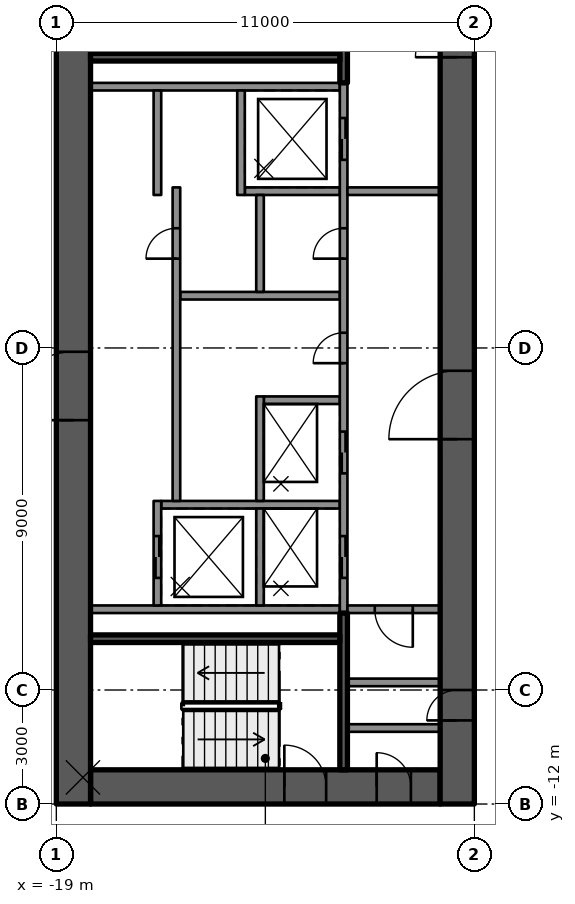
"""IFC4 building model, lengths in metres.
Left out: names, types, materials, properties, quantities, classifications, styles, units other than length and angle.
Written with IfcOpenShell. Run it as: python <this file> out.ifc"""

import sys

from ifc_helpers import new_model, si_unit, direction, frame, frame_2d, origin, place, context, subcontext, project, spatial, rectangle, extrude, element, fill, save


model = new_model("IFC4")
c1 = context("Model", 3, precision=1e-05, world=origin(), true_north=direction((0.0, 1.0)))
c2 = subcontext(c1, "Body", "Model", "MODEL_VIEW")
j1 = project(units=[si_unit("LENGTHUNIT", "METRE"), si_unit("PLANEANGLEUNIT", "RADIAN")], contexts=[c1])
p1 = place(None, origin())
s1 = spatial("IfcSite", under=j1, at=p1, CompositionType="ELEMENT")
p2 = place(p1, origin())
s2 = spatial("IfcBuilding", under=s1, at=p2, CompositionType="ELEMENT")
p3 = place(p2, frame((0.0, 0.0, 232.0)))
s3 = spatial("IfcBuildingStorey", under=s2, at=p3, CompositionType="ELEMENT", Elevation=232.0)
p4 = place(p3, frame((-18.1, -11.55, 0.0), z_axis=(0.0, 0.0, 1.0), x_axis=(1.0, 0.0, 0.0)))
e1 = element("IfcWall", 1, at=p4, inside=s3, PredefinedType="SHEAR", context=c2, shape_type="SweptSolid", body=[
    extrude(rectangle(XDim=9.2, YDim=0.9, at=frame_2d((4.6, 0.0))), origin(), (0.0, 0.0, 1.0), 3.5),
])
p5 = place(p4, frame((5.1, 0.0, 0.0)))
e2 = element("IfcOpeningElement", 2, at=p5, cuts=e1, PredefinedType="OPENING", context=c2, shape_type="SweptSolid", body=[
    extrude(rectangle(XDim=1.1, YDim=2.1, at=frame_2d((0.55, 1.05))), frame((0.0, 0.46, 0.0), z_axis=(0.0, -1.0, 0.0), x_axis=(1.0, 0.0, 0.0)), (0.0, 0.0, 1.0), 0.92),
])
p6 = place(p4, frame((7.53, 0.0, 0.0)))
e3 = element("IfcOpeningElement", 3, at=p6, cuts=e1, PredefinedType="OPENING", context=c2, shape_type="SweptSolid", body=[
    extrude(rectangle(XDim=0.9, YDim=2.1, at=frame_2d((0.45, 1.05))), frame((0.0, 0.46, 0.0), z_axis=(0.0, -1.0, 0.0), x_axis=(1.0, 0.0, 0.0)), (0.0, 0.0, 1.0), 0.92),
])
p7 = place(p3, frame((-18.55, -12.0, 0.0), z_axis=(0.0, 0.0, 1.0), x_axis=(0.0, 1.0, 0.0)))
e4 = element("IfcWall", 4, at=p7, inside=s3, PredefinedType="SHEAR", context=c2, shape_type="SweptSolid", body=[
    extrude(rectangle(XDim=24.0, YDim=0.9, at=frame_2d((12.0, 0.0))), origin(), (0.0, 0.0, 1.0), 3.5),
])
p8 = place(p7, frame((10.1, 0.0, 0.0)))
e5 = element("IfcOpeningElement", 5, at=p8, cuts=e4, PredefinedType="OPENING", context=c2, shape_type="SweptSolid", body=[
    extrude(rectangle(XDim=1.8, YDim=2.1, at=frame_2d((0.9, 1.05))), frame((0.0, 0.46, 0.0), z_axis=(0.0, -1.0, 0.0), x_axis=(1.0, 0.0, 0.0)), (0.0, 0.0, 1.0), 0.92),
])
p9 = place(p3, frame((-8.45, -12.0, 0.0), z_axis=(0.0, 0.0, 1.0), x_axis=(0.0, 1.0, 0.0)))
e6 = element("IfcWall", 6, at=p9, inside=s3, PredefinedType="SHEAR", context=c2, shape_type="SweptSolid", body=[
    extrude(rectangle(XDim=24.0, YDim=0.9, at=frame_2d((12.0, 0.0))), origin(), (0.0, 0.0, 1.0), 3.5),
])
p10 = place(p9, frame((9.6, 0.0, 0.0)))
e7 = element("IfcOpeningElement", 7, at=p10, cuts=e6, PredefinedType="OPENING", context=c2, shape_type="SweptSolid", body=[
    extrude(rectangle(XDim=1.8, YDim=2.1, at=frame_2d((0.9, 1.05))), frame((0.0, 0.46, 0.0), z_axis=(0.0, -1.0, 0.0), x_axis=(1.0, 0.0, 0.0)), (0.0, 0.0, 1.0), 0.92),
])
p11 = place(p9, frame((19.65, 0.0, 0.0)))
e8 = element("IfcOpeningElement", 8, at=p11, cuts=e6, PredefinedType="OPENING", context=c2, shape_type="SweptSolid", body=[
    extrude(rectangle(XDim=1.1, YDim=2.1, at=frame_2d((0.55, 1.05))), frame((0.0, 0.46, 0.0), z_axis=(0.0, -1.0, 0.0), x_axis=(1.0, 0.0, 0.0)), (0.0, 0.0, 1.0), 0.92),
])
p12 = place(p9, frame((2.2, 0.0, 0.0)))
e9 = element("IfcOpeningElement", 9, at=p12, cuts=e6, PredefinedType="OPENING", context=c2, shape_type="SweptSolid", body=[
    extrude(rectangle(XDim=0.8, YDim=2.1, at=frame_2d((0.4, 1.05))), frame((0.0, 0.46, 0.0), z_axis=(0.0, -1.0, 0.0), x_axis=(1.0, 0.0, 0.0)), (0.0, 0.0, 1.0), 0.92),
])
for number, where, z_axis, x_axis in (
    (10, (-11.54, 6.875, 0.0), (0.0, 0.0, 1.0), (-1.0, 0.0, 0.0)),
    (11, (-11.54, -6.875, 0.0), (0.0, 0.0, 1.0), (-1.0, 0.0, 0.0)),
):
    element("IfcWall", number, at=place(p3, frame(where, z_axis=z_axis, x_axis=x_axis)), inside=s3, PredefinedType="SOLIDWALL", context=c2, shape_type="SweptSolid", body=[
        extrude(rectangle(XDim=6.56, YDim=0.2, at=frame_2d((3.28, 0.0))), origin(), (0.0, 0.0, 1.0), 3.09),
    ])
p13 = place(p3, frame((-11.54, -4.125, 0.0), z_axis=(0.0, 0.0, 1.0), x_axis=(-1.0, 0.0, 0.0)))
e12 = element("IfcWall", 12, at=p13, inside=s3, PredefinedType="SOLIDWALL", context=c2, shape_type="SweptSolid", body=[
    extrude(rectangle(XDim=4.7, YDim=0.2, at=frame_2d((2.35, 0.0))), origin(), (0.0, 0.0, 1.0), 3.09),
])
p14 = place(p3, frame((-11.54, -1.375, 0.0), z_axis=(0.0, 0.0, 1.0), x_axis=(-1.0, 0.0, 0.0)))
e13 = element("IfcWall", 13, at=p14, inside=s3, PredefinedType="SOLIDWALL", context=c2, shape_type="SweptSolid", body=[
    extrude(rectangle(XDim=2.0, YDim=0.2, at=frame_2d((1.0, 0.0))), origin(), (0.0, 0.0, 1.0), 3.09),
])
p15 = place(p3, frame((-11.54, 1.375, 0.0), z_axis=(0.0, 0.0, 1.0), x_axis=(-1.0, 0.0, 0.0)))
e14 = element("IfcWall", 14, at=p15, inside=s3, PredefinedType="SOLIDWALL", context=c2, shape_type="SweptSolid", body=[
    extrude(rectangle(XDim=4.2, YDim=0.2, at=frame_2d((2.1, 0.0))), origin(), (0.0, 0.0, 1.0), 3.09),
])
p16 = place(p3, frame((-11.54, 4.125, 0.0), z_axis=(0.0, 0.0, 1.0), x_axis=(-1.0, 0.0, 0.0)))
e15 = element("IfcWall", 15, at=p16, inside=s3, PredefinedType="SOLIDWALL", context=c2, shape_type="SweptSolid", body=[
    extrude(rectangle(XDim=2.5, YDim=0.2, at=frame_2d((1.25, 0.0))), origin(), (0.0, 0.0, 1.0), 3.09),
])
p17 = place(p3, frame((-11.44, -6.975, 0.0), z_axis=(0.0, 0.0, 1.0), x_axis=(0.0, 1.0, 0.0)))
e16 = element("IfcWall", 16, at=p17, inside=s3, PredefinedType="SOLIDWALL", context=c2, shape_type="SweptSolid", body=[
    extrude(rectangle(XDim=13.95, YDim=0.2, at=frame_2d((6.975, 0.0))), origin(), (0.0, 0.0, 1.0), 3.09),
])
p18 = place(p17, frame((0.925, 0.0, 0.0)))
e17 = element("IfcOpeningElement", 17, at=p18, cuts=e16, PredefinedType="OPENING", context=c2, shape_type="SweptSolid", body=[
    extrude(rectangle(XDim=1.1, YDim=2.1, at=frame_2d((0.55, 1.05))), frame((0.0, 0.11, 0.0), z_axis=(0.0, -1.0, 0.0), x_axis=(1.0, 0.0, 0.0)), (0.0, 0.0, 1.0), 0.22),
])
p19 = place(p17, frame((3.675, 0.0, 0.0)))
e18 = element("IfcOpeningElement", 18, at=p19, cuts=e16, PredefinedType="OPENING", context=c2, shape_type="SweptSolid", body=[
    extrude(rectangle(XDim=1.1, YDim=2.1, at=frame_2d((0.55, 1.05))), frame((0.0, 0.11, 0.0), z_axis=(0.0, -1.0, 0.0), x_axis=(1.0, 0.0, 0.0)), (0.0, 0.0, 1.0), 0.22),
])
p20 = place(p17, frame((11.925, 0.0, 0.0)))
e19 = element("IfcOpeningElement", 19, at=p20, cuts=e16, PredefinedType="OPENING", context=c2, shape_type="SweptSolid", body=[
    extrude(rectangle(XDim=1.1, YDim=2.1, at=frame_2d((0.55, 1.05))), frame((0.0, 0.11, 0.0), z_axis=(0.0, -1.0, 0.0), x_axis=(1.0, 0.0, 0.0)), (0.0, 0.0, 1.0), 0.22),
])
p21 = place(p17, frame((6.575, 0.0, 0.0)))
e20 = element("IfcOpeningElement", 20, at=p21, cuts=e16, PredefinedType="OPENING", context=c2, shape_type="SweptSolid", body=[
    extrude(rectangle(XDim=0.8, YDim=2.1, at=frame_2d((0.4, 1.05))), frame((0.0, 0.11, 0.0), z_axis=(0.0, -1.0, 0.0), x_axis=(1.0, 0.0, 0.0)), (0.0, 0.0, 1.0), 0.22),
])
p22 = place(p17, frame((9.325, 0.0, 0.0)))
e21 = element("IfcOpeningElement", 21, at=p22, cuts=e16, PredefinedType="OPENING", context=c2, shape_type="SweptSolid", body=[
    extrude(rectangle(XDim=0.8, YDim=2.1, at=frame_2d((0.4, 1.05))), frame((0.0, 0.11, 0.0), z_axis=(0.0, -1.0, 0.0), x_axis=(1.0, 0.0, 0.0)), (0.0, 0.0, 1.0), 0.22),
])
p23 = place(p3, frame((-13.64, -6.775, 0.0), z_axis=(0.0, 0.0, 1.0), x_axis=(0.0, 1.0, 0.0)))
e22 = element("IfcWall", 22, at=p23, inside=s3, PredefinedType="SOLIDWALL", context=c2, shape_type="SweptSolid", body=[
    extrude(rectangle(XDim=2.55, YDim=0.2, at=frame_2d((1.275, 0.0))), origin(), (0.0, 0.0, 1.0), 3.09),
])
p24 = place(p3, frame((-13.64, -4.025, 0.0), z_axis=(0.0, 0.0, 1.0), x_axis=(0.0, 1.0, 0.0)))
e23 = element("IfcWall", 23, at=p24, inside=s3, PredefinedType="SOLIDWALL", context=c2, shape_type="SweptSolid", body=[
    extrude(rectangle(XDim=2.75, YDim=0.2, at=frame_2d((1.375, 0.0))), origin(), (0.0, 0.0, 1.0), 3.09),
])
p25 = place(p3, frame((-13.64, 1.475, 0.0), z_axis=(0.0, 0.0, 1.0), x_axis=(0.0, 1.0, 0.0)))
e24 = element("IfcWall", 24, at=p25, inside=s3, PredefinedType="SOLIDWALL", context=c2, shape_type="SweptSolid", body=[
    extrude(rectangle(XDim=2.55, YDim=0.2, at=frame_2d((1.275, 0.0))), origin(), (0.0, 0.0, 1.0), 3.09),
])
p26 = place(p3, frame((-14.14, 4.025, 0.0), z_axis=(0.0, 0.0, 1.0), x_axis=(0.0, 1.0, 0.0)))
e25 = element("IfcWall", 25, at=p26, inside=s3, PredefinedType="SOLIDWALL", context=c2, shape_type="SweptSolid", body=[
    extrude(rectangle(XDim=2.75, YDim=0.2, at=frame_2d((1.375, 0.0))), origin(), (0.0, 0.0, 1.0), 3.09),
])
p27 = place(p3, frame((-16.34, -6.775, 0.0), z_axis=(0.0, 0.0, 1.0), x_axis=(0.0, 1.0, 0.0)))
e26 = element("IfcWall", 26, at=p27, inside=s3, PredefinedType="SOLIDWALL", context=c2, shape_type="SweptSolid", body=[
    extrude(rectangle(XDim=2.75, YDim=0.2, at=frame_2d((1.375, 0.0))), origin(), (0.0, 0.0, 1.0), 3.09),
])
p28 = place(p27, frame((0.725, 0.0, 0.0)))
e27 = element("IfcOpeningElement", 27, at=p28, cuts=e26, PredefinedType="OPENING", context=c2, shape_type="SweptSolid", body=[
    extrude(rectangle(XDim=1.1, YDim=2.1, at=frame_2d((0.55, 1.05))), frame((0.0, 0.11, 0.0), z_axis=(0.0, -1.0, 0.0), x_axis=(1.0, 0.0, 0.0)), (0.0, 0.0, 1.0), 0.22),
])
p29 = place(p3, frame((-15.84, -4.025, 0.0), z_axis=(0.0, 0.0, 1.0), x_axis=(0.0, 1.0, 0.0)))
e28 = element("IfcWall", 28, at=p29, inside=s3, PredefinedType="SOLIDWALL", context=c2, shape_type="SweptSolid", body=[
    extrude(rectangle(XDim=8.25, YDim=0.2, at=frame_2d((4.125, 0.0))), origin(), (0.0, 0.0, 1.0), 3.09),
])
p30 = place(p29, frame((6.375, 0.0, 0.0)))
e29 = element("IfcOpeningElement", 29, at=p30, cuts=e28, PredefinedType="OPENING", context=c2, shape_type="SweptSolid", body=[
    extrude(rectangle(XDim=0.8, YDim=2.1, at=frame_2d((0.4, 1.05))), frame((0.0, 0.11, 0.0), z_axis=(0.0, -1.0, 0.0), x_axis=(1.0, 0.0, 0.0)), (0.0, 0.0, 1.0), 0.22),
])
p31 = place(p3, frame((-16.34, 4.025, 0.0), z_axis=(0.0, 0.0, 1.0), x_axis=(0.0, 1.0, 0.0)))
e30 = element("IfcWall", 30, at=p31, inside=s3, PredefinedType="SOLIDWALL", context=c2, shape_type="SweptSolid", body=[
    extrude(rectangle(XDim=2.75, YDim=0.2, at=frame_2d((1.375, 0.0))), origin(), (0.0, 0.0, 1.0), 3.09),
])
p32 = place(p3, frame((-11.44, 6.975, 0.0), z_axis=(0.0, 0.0, 1.0), x_axis=(0.0, 1.0, 0.0)))
e31 = element("IfcWall", 31, at=p32, inside=s3, PredefinedType="SOLIDWALL", context=c2, shape_type="SweptSolid", body=[
    extrude(rectangle(XDim=4.125, YDim=0.2, at=frame_2d((2.062, 0.0))), origin(), (0.0, 0.0, 1.0), 3.09),
])
p33 = place(p32, frame((2.1, 0.0, 0.0)))
e32 = element("IfcOpeningElement", 32, at=p33, cuts=e31, PredefinedType="OPENING", context=c2, shape_type="SweptSolid", body=[
    extrude(rectangle(XDim=1.1, YDim=2.1, at=frame_2d((0.55, 1.05))), frame((0.0, 0.11, 0.0), z_axis=(0.0, -1.0, 0.0), x_axis=(1.0, 0.0, 0.0)), (0.0, 0.0, 1.0), 0.22),
])
p34 = place(p3, frame((-11.54, 7.65, 0.0), z_axis=(0.0, 0.0, 1.0), x_axis=(-1.0, 0.0, 0.0)))
e33 = element("IfcWall", 33, at=p34, inside=s3, PredefinedType="SOLIDWALL", context=c2, shape_type="SweptSolid", body=[
    extrude(rectangle(XDim=6.56, YDim=0.2, at=frame_2d((3.28, 0.0))), origin(), (0.0, 0.0, 1.0), 3.09),
])
p35 = place(p3, frame((-11.44, -11.1, 0.0), z_axis=(0.0, 0.0, 1.0), x_axis=(0.0, 1.0, 0.0)))
e34 = element("IfcWall", 34, at=p35, inside=s3, PredefinedType="SOLIDWALL", context=c2, shape_type="SweptSolid", body=[
    extrude(rectangle(XDim=4.125, YDim=0.2, at=frame_2d((2.062, 0.0))), origin(), (0.0, 0.0, 1.0), 3.09),
])
p36 = place(p3, frame((-11.54, -7.65, 0.0), z_axis=(0.0, 0.0, 1.0), x_axis=(-1.0, 0.0, 0.0)))
e35 = element("IfcWall", 35, at=p36, inside=s3, PredefinedType="SOLIDWALL", context=c2, shape_type="SweptSolid", body=[
    extrude(rectangle(XDim=6.56, YDim=0.2, at=frame_2d((3.28, 0.0))), origin(), (0.0, 0.0, 1.0), 3.09),
])
p37 = place(p3, frame((-8.9, 4.125, 0.0), z_axis=(0.0, 0.0, 1.0), x_axis=(-1.0, 0.0, 0.0)))
e36 = element("IfcWall", 36, at=p37, inside=s3, PredefinedType="PARTITIONING", context=c2, shape_type="SweptSolid", body=[
    extrude(rectangle(XDim=2.44, YDim=0.2, at=frame_2d((1.22, 0.0))), origin(), (0.0, 0.0, 1.0), 3.09),
])
p38 = place(p3, frame((-8.9, -6.875, 0.0), z_axis=(0.0, 0.0, 1.0), x_axis=(-1.0, 0.0, 0.0)))
e37 = element("IfcWall", 37, at=p38, inside=s3, PredefinedType="PARTITIONING", context=c2, shape_type="SweptSolid", body=[
    extrude(rectangle(XDim=2.44, YDim=0.2, at=frame_2d((1.22, 0.0))), origin(), (0.0, 0.0, 1.0), 3.09),
])
p39 = place(p38, frame((0.72, 0.0, 0.0)))
e38 = element("IfcOpeningElement", 38, at=p39, cuts=e37, PredefinedType="OPENING", context=c2, shape_type="SweptSolid", body=[
    extrude(rectangle(XDim=1.0, YDim=2.1, at=frame_2d((0.5, 1.05))), frame((0.0, 0.11, 0.0), z_axis=(0.0, -1.0, 0.0), x_axis=(1.0, 0.0, 0.0)), (0.0, 0.0, 1.0), 0.22),
])
for number, where, z_axis, x_axis in (
    (39, (-8.9, -10.0, 0.0), (0.0, 0.0, 1.0), (-1.0, 0.0, 0.0)),
    (40, (-8.9, -8.8, 0.0), (0.0, 0.0, 1.0), (-1.0, 0.0, 0.0)),
):
    element("IfcWall", number, at=place(p3, frame(where, z_axis=z_axis, x_axis=x_axis)), inside=s3, PredefinedType="PARTITIONING", context=c2, shape_type="SweptSolid", body=[
        extrude(rectangle(XDim=2.44, YDim=0.2, at=frame_2d((1.22, 0.0))), origin(), (0.0, 0.0, 1.0), 3.09),
    ])
p40 = place(p18, origin())
e41 = element("IfcDoor", 41, at=p40, inside=s3, OperationType="DOUBLE_DOOR_SLIDING", PredefinedType="DOOR", context=c2, shape_type="SweptSolid", body=[
    extrude(rectangle(XDim=1.1, YDim=2.1, at=frame_2d((0.55, 1.05))), frame((0.0, 0.025, 0.0), z_axis=(0.0, -1.0, 0.0), x_axis=(1.0, 0.0, 0.0)), (0.0, 0.0, 1.0), 0.05),
])
fill(e17, e41)
p41 = place(p28, origin())
e42 = element("IfcDoor", 42, at=p41, inside=s3, OperationType="DOUBLE_DOOR_SLIDING", PredefinedType="DOOR", context=c2, shape_type="SweptSolid", body=[
    extrude(rectangle(XDim=1.1, YDim=2.1, at=frame_2d((0.55, 1.05))), frame((0.0, 0.025, 0.0), z_axis=(0.0, -1.0, 0.0), x_axis=(1.0, 0.0, 0.0)), (0.0, 0.0, 1.0), 0.05),
])
fill(e27, e42)
p42 = place(p19, origin())
e43 = element("IfcDoor", 43, at=p42, inside=s3, OperationType="DOUBLE_DOOR_SLIDING", PredefinedType="DOOR", context=c2, shape_type="SweptSolid", body=[
    extrude(rectangle(XDim=1.1, YDim=2.1, at=frame_2d((0.55, 1.05))), frame((0.0, 0.025, 0.0), z_axis=(0.0, -1.0, 0.0), x_axis=(1.0, 0.0, 0.0)), (0.0, 0.0, 1.0), 0.05),
])
fill(e18, e43)
p43 = place(p20, origin())
e44 = element("IfcDoor", 44, at=p43, inside=s3, OperationType="DOUBLE_DOOR_SLIDING", PredefinedType="DOOR", context=c2, shape_type="SweptSolid", body=[
    extrude(rectangle(XDim=1.1, YDim=2.1, at=frame_2d((0.55, 1.05))), frame((0.0, 0.025, 0.0), z_axis=(0.0, -1.0, 0.0), x_axis=(1.0, 0.0, 0.0)), (0.0, 0.0, 1.0), 0.05),
])
fill(e19, e44)
p44 = place(p21, origin())
e45 = element("IfcDoor", 45, at=p44, inside=s3, OperationType="SINGLE_SWING_RIGHT", PredefinedType="DOOR", context=c2, shape_type="SweptSolid", body=[
    extrude(rectangle(XDim=0.8, YDim=2.1, at=frame_2d((0.4, 1.05))), frame((0.0, 0.025, 0.0), z_axis=(0.0, -1.0, 0.0), x_axis=(1.0, 0.0, 0.0)), (0.0, 0.0, 1.0), 0.05),
])
fill(e20, e45)
p45 = place(p22, origin())
e46 = element("IfcDoor", 46, at=p45, inside=s3, OperationType="SINGLE_SWING_LEFT", PredefinedType="DOOR", context=c2, shape_type="SweptSolid", body=[
    extrude(rectangle(XDim=0.8, YDim=2.1, at=frame_2d((0.4, 1.05))), frame((0.0, 0.025, 0.0), z_axis=(0.0, -1.0, 0.0), x_axis=(1.0, 0.0, 0.0)), (0.0, 0.0, 1.0), 0.05),
])
fill(e21, e46)
p46 = place(p30, origin())
e47 = element("IfcDoor", 47, at=p46, inside=s3, OperationType="SINGLE_SWING_LEFT", PredefinedType="DOOR", context=c2, shape_type="SweptSolid", body=[
    extrude(rectangle(XDim=0.8, YDim=2.1, at=frame_2d((0.4, 1.05))), frame((0.0, 0.025, 0.0), z_axis=(0.0, -1.0, 0.0), x_axis=(1.0, 0.0, 0.0)), (0.0, 0.0, 1.0), 0.05),
])
fill(e29, e47)
p47 = place(p10, origin())
e48 = element("IfcDoor", 48, at=p47, inside=s3, OperationType="SINGLE_SWING_LEFT", PredefinedType="DOOR", context=c2, shape_type="SweptSolid", body=[
    extrude(rectangle(XDim=1.8, YDim=2.1, at=frame_2d((0.9, 1.05))), frame((0.0, 0.025, 0.0), z_axis=(0.0, -1.0, 0.0), x_axis=(1.0, 0.0, 0.0)), (0.0, 0.0, 1.0), 0.05),
])
fill(e7, e48)
p48 = place(p8, origin())
e49 = element("IfcDoor", 49, at=p48, inside=s3, OperationType="SINGLE_SWING_LEFT", PredefinedType="DOOR", context=c2, shape_type="SweptSolid", body=[
    extrude(rectangle(XDim=1.8, YDim=2.1, at=frame_2d((0.9, 1.05))), frame((0.0, 0.025, 0.0), z_axis=(0.0, -1.0, 0.0), x_axis=(1.0, 0.0, 0.0)), (0.0, 0.0, 1.0), 0.05),
])
fill(e5, e49)
p49 = place(p11, origin())
e50 = element("IfcDoor", 50, at=p49, inside=s3, OperationType="SINGLE_SWING_RIGHT", PredefinedType="DOOR", context=c2, shape_type="SweptSolid", body=[
    extrude(rectangle(XDim=1.1, YDim=2.1, at=frame_2d((0.55, 1.05))), frame((0.0, 0.025, 0.0), z_axis=(0.0, -1.0, 0.0), x_axis=(1.0, 0.0, 0.0)), (0.0, 0.0, 1.0), 0.05),
])
fill(e8, e50)
p50 = place(p5, origin())
e51 = element("IfcDoor", 51, at=p50, inside=s3, OperationType="SINGLE_SWING_RIGHT", PredefinedType="DOOR", context=c2, shape_type="SweptSolid", body=[
    extrude(rectangle(XDim=1.1, YDim=2.1, at=frame_2d((0.55, 1.05))), frame((0.0, 0.025, 0.0), z_axis=(0.0, -1.0, 0.0), x_axis=(1.0, 0.0, 0.0)), (0.0, 0.0, 1.0), 0.05),
])
fill(e2, e51)
p51 = place(p6, origin())
e52 = element("IfcDoor", 52, at=p51, inside=s3, OperationType="SINGLE_SWING_RIGHT", PredefinedType="DOOR", context=c2, shape_type="SweptSolid", body=[
    extrude(rectangle(XDim=0.9, YDim=2.1, at=frame_2d((0.45, 1.05))), frame((0.0, 0.025, 0.0), z_axis=(0.0, -1.0, 0.0), x_axis=(1.0, 0.0, 0.0)), (0.0, 0.0, 1.0), 0.05),
])
fill(e3, e52)
p52 = place(p12, origin())
e53 = element("IfcDoor", 53, at=p52, inside=s3, OperationType="SINGLE_SWING_LEFT", PredefinedType="DOOR", context=c2, shape_type="SweptSolid", body=[
    extrude(rectangle(XDim=0.8, YDim=2.1, at=frame_2d((0.4, 1.05))), frame((0.0, 0.025, 0.0), z_axis=(0.0, -1.0, 0.0), x_axis=(1.0, 0.0, 0.0)), (0.0, 0.0, 1.0), 0.05),
])
fill(e9, e53)
p53 = place(p39, origin())
e54 = element("IfcDoor", 54, at=p53, inside=s3, OperationType="SINGLE_SWING_RIGHT", PredefinedType="DOOR", context=c2, shape_type="SweptSolid", body=[
    extrude(rectangle(XDim=1.0, YDim=2.1, at=frame_2d((0.5, 1.05))), frame((0.0, 0.025, 0.0), z_axis=(0.0, -1.0, 0.0), x_axis=(1.0, 0.0, 0.0)), (0.0, 0.0, 1.0), 0.05),
])
fill(e38, e54)
save(model, sys.argv[1])
